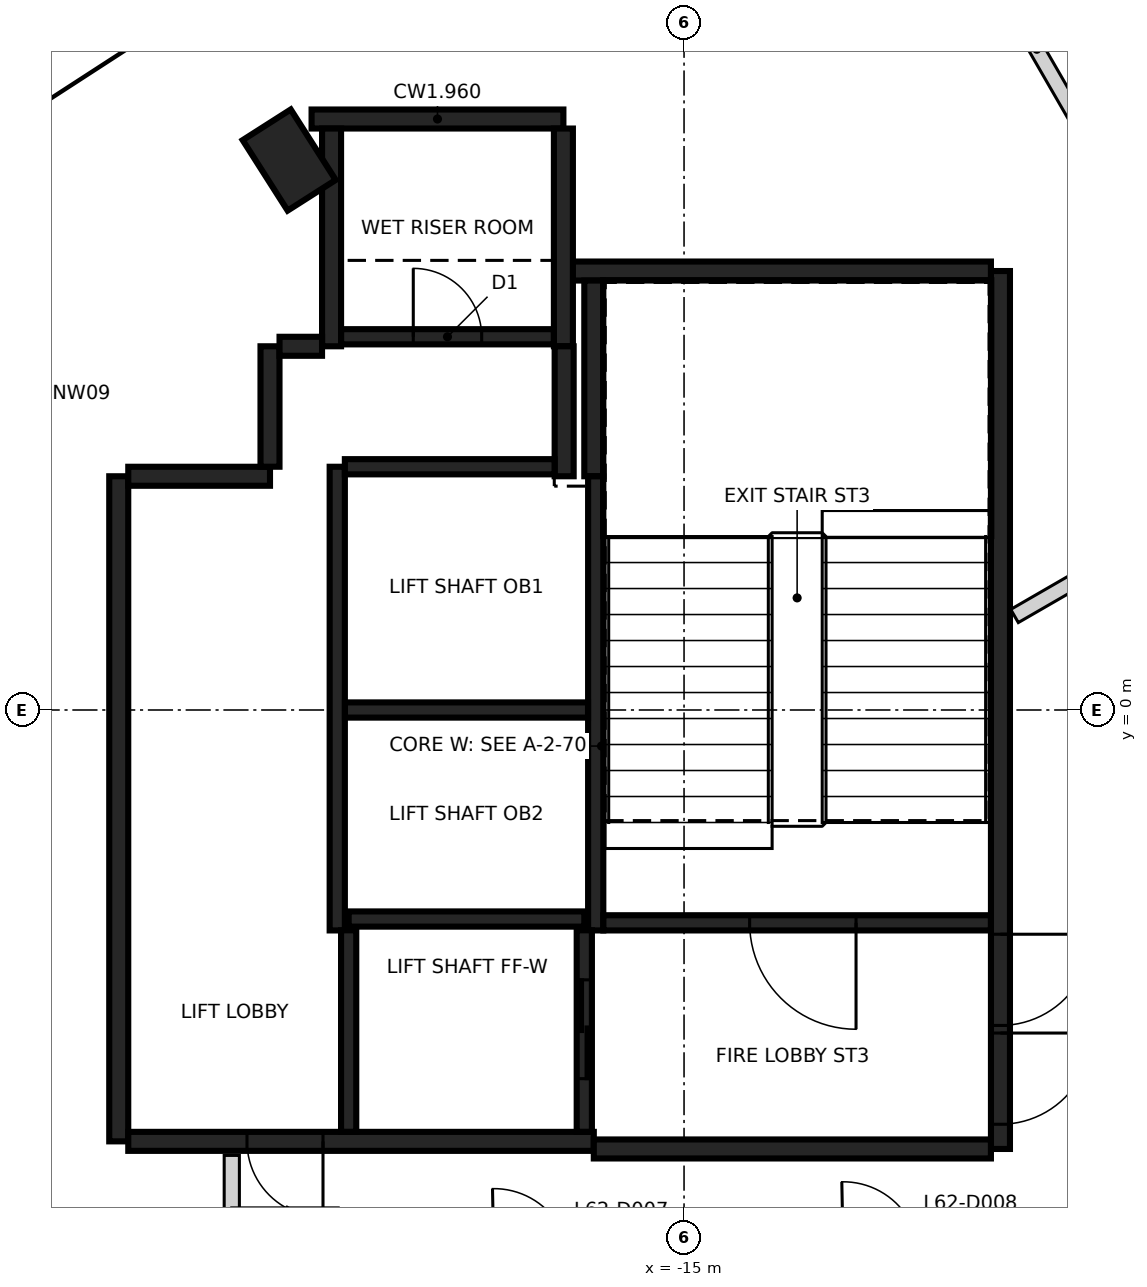
"""IFC4 building model, lengths in metres.
Left out: names, types, materials, properties, quantities, classifications, styles, units other than length and angle.
Written with IfcOpenShell. Run it as: python <this file> out.ifc"""

import sys

from ifc_helpers import new_model, si_unit, direction, frame, frame_2d, origin, origin_2d, place, context, subcontext, project, spatial, rectangle, extrude, element, fill, save


model = new_model("IFC4")
c1 = context("Model", 3, precision=1e-05, world=origin(), true_north=direction((0.0, 1.0)))
c2 = subcontext(c1, "Body", "Model", "MODEL_VIEW")
j1 = project(units=[si_unit("LENGTHUNIT", "METRE"), si_unit("PLANEANGLEUNIT", "RADIAN")], contexts=[c1])
p1 = place(None, origin())
s1 = spatial("IfcSite", under=j1, at=p1, CompositionType="ELEMENT")
p2 = place(p1, origin())
s2 = spatial("IfcBuilding", under=s1, at=p2, CompositionType="ELEMENT")
p3 = place(p2, frame((0.0, 0.0, 246.6)))
s3 = spatial("IfcBuildingStorey", under=s2, at=p3, CompositionType="ELEMENT", Elevation=246.6)
p4 = place(p3, frame((-20.195, 7.235, -0.35), z_axis=(0.0, 0.0, 1.0), x_axis=(-0.537585144719, 0.843209471114, 0.0)))
e1 = element("IfcColumn", 1, at=p4, inside=s3, PredefinedType="COLUMN", context=c2, shape_type="SweptSolid", body=[
    extrude(rectangle(XDim=1.1, YDim=0.75, at=origin_2d()), origin(), (0.0, 0.0, 1.0), 3.6),
])
p5 = place(p3, frame((-10.837, 5.775, 0.0), z_axis=(0.0, 0.0, 1.0), x_axis=(0.0, -1.0, 0.0)))
e2 = element("IfcWall", 2, at=p5, inside=s3, PredefinedType="SHEAR", context=c2, shape_type="SweptSolid", body=[
    extrude(rectangle(XDim=11.55, YDim=0.25, at=frame_2d((5.775, 0.0))), origin(), (0.0, 0.0, 1.0), 3.25),
])
p6 = place(p5, frame((10.025, 0.0, 0.0)))
e3 = element("IfcOpeningElement", 3, at=p6, cuts=e2, PredefinedType="OPENING", context=c2, shape_type="SweptSolid", body=[
    extrude(rectangle(XDim=1.2, YDim=2.1, at=frame_2d((0.6, 1.05))), frame((0.0, 0.135, 0.0), z_axis=(0.0, -1.0, 0.0), x_axis=(1.0, 0.0, 0.0)), (0.0, 0.0, 1.0), 0.27),
])
p7 = place(p5, frame((8.725, 0.0, 0.0)))
e4 = element("IfcOpeningElement", 4, at=p7, cuts=e2, PredefinedType="OPENING", context=c2, shape_type="SweptSolid", body=[
    extrude(rectangle(XDim=1.2, YDim=2.1, at=frame_2d((0.6, 1.05))), frame((0.0, 0.135, 0.0), z_axis=(0.0, -1.0, 0.0), x_axis=(1.0, 0.0, 0.0)), (0.0, 0.0, 1.0), 0.27),
])
p8 = place(p3, frame((-22.437, -5.675, 0.0), z_axis=(0.0, 0.0, 1.0), x_axis=(0.0, 1.0, 0.0)))
e5 = element("IfcWall", 5, at=p8, inside=s3, PredefinedType="SHEAR", context=c2, shape_type="SweptSolid", body=[
    extrude(rectangle(XDim=8.75, YDim=0.25, at=frame_2d((4.375, 0.0))), origin(), (0.0, 0.0, 1.0), 3.25),
])
p9 = place(p3, frame((-16.187, -5.675, 0.0), z_axis=(0.0, 0.0, 1.0), x_axis=(-1.0, 0.0, 0.0)))
e6 = element("IfcWall", 6, at=p9, inside=s3, PredefinedType="SHEAR", context=c2, shape_type="SweptSolid", body=[
    extrude(rectangle(XDim=6.125, YDim=0.25, at=frame_2d((3.062, 0.0))), origin(), (0.0, 0.0, 1.0), 3.25),
])
p10 = place(p9, frame((3.563, 0.0, 0.0)))
e7 = element("IfcOpeningElement", 7, at=p10, cuts=e6, PredefinedType="OPENING", context=c2, shape_type="SweptSolid", body=[
    extrude(rectangle(XDim=1.0, YDim=2.1, at=frame_2d((0.5, 1.05))), frame((0.0, 0.135, 0.0), z_axis=(0.0, -1.0, 0.0), x_axis=(1.0, 0.0, 0.0)), (0.0, 0.0, 1.0), 0.27),
])
p11 = place(p3, frame((-10.963, -5.775, 0.0), z_axis=(0.0, 0.0, 1.0), x_axis=(-1.0, 0.0, 0.0)))
e8 = element("IfcWall", 8, at=p11, inside=s3, PredefinedType="SHEAR", context=c2, shape_type="SweptSolid", body=[
    extrude(rectangle(XDim=5.225, YDim=0.25, at=frame_2d((2.612, 0.0))), origin(), (0.0, 0.0, 1.0), 3.25),
])
p12 = place(p3, frame((-16.472, 5.775, 0.0), z_axis=(0.0, 0.0, 1.0), x_axis=(1.0, 0.0, 0.0)))
e9 = element("IfcWall", 9, at=p12, inside=s3, PredefinedType="SHEAR", context=c2, shape_type="SweptSolid", body=[
    extrude(rectangle(XDim=5.51, YDim=0.25, at=frame_2d((2.755, 0.0))), origin(), (0.0, 0.0, 1.0), 3.25),
])
p13 = place(p3, frame((-19.9, 7.775, 0.0), z_axis=(0.0, 0.0, 1.0), x_axis=(1.0, 0.0, 0.0)))
e10 = element("IfcWall", 10, at=p13, inside=s3, PredefinedType="SHEAR", context=c2, shape_type="SweptSolid", body=[
    extrude(rectangle(XDim=3.313, YDim=0.25, at=frame_2d((1.656, 0.0))), origin(), (0.0, 0.0, 1.0), 3.25),
])
for number, where, z_axis, x_axis in (
    (11, (-16.587, 7.65, 0.0), (0.0, 0.0, 1.0), (0.0, -1.0, 0.0)),
    (12, (-19.637, 4.785, 0.0), (0.0, 0.0, 1.0), (0.0, 1.0, 0.0)),
):
    element("IfcWall", number, at=place(p3, frame(where, z_axis=z_axis, x_axis=x_axis)), inside=s3, PredefinedType="SHEAR", context=c2, shape_type="SweptSolid", body=[
        extrude(rectangle(XDim=2.865, YDim=0.25, at=frame_2d((1.432, 0.0))), origin(), (0.0, 0.0, 1.0), 3.25),
    ])
p14 = place(p3, frame((-16.187, 3.075, 0.0), z_axis=(0.0, 0.0, 1.0), x_axis=(0.0, 1.0, 0.0)))
e13 = element("IfcWall", 13, at=p14, inside=s3, PredefinedType="SHEAR", context=c2, shape_type="SweptSolid", body=[
    extrude(rectangle(XDim=2.575, YDim=0.25, at=frame_2d((1.287, 0.0))), origin(), (0.0, 0.0, 1.0), 3.25),
])
p15 = place(p3, frame((-22.312, 3.075, 0.0), z_axis=(0.0, 0.0, 1.0), x_axis=(1.0, 0.0, 0.0)))
e14 = element("IfcWall", 14, at=p15, inside=s3, PredefinedType="SHEAR", context=c2, shape_type="SweptSolid", body=[
    extrude(rectangle(XDim=1.865, YDim=0.25, at=frame_2d((0.932, 0.0))), origin(), (0.0, 0.0, 1.0), 3.25),
])
p16 = place(p3, frame((-16.577, 4.785, 0.0), z_axis=(0.0, 0.0, 1.0), x_axis=(0.0, -1.0, 0.0)))
e15 = element("IfcWall", 15, at=p16, inside=s3, PredefinedType="SHEAR", context=c2, shape_type="SweptSolid", body=[
    extrude(rectangle(XDim=1.71, YDim=0.25, at=frame_2d((0.855, 0.0))), origin(), (0.0, 0.0, 1.0), 3.25),
])
p17 = place(p3, frame((-20.447, 3.2, 0.0), z_axis=(0.0, 0.0, 1.0), x_axis=(0.0, 1.0, 0.0)))
e16 = element("IfcWall", 16, at=p17, inside=s3, PredefinedType="SHEAR", context=c2, shape_type="SweptSolid", body=[
    extrude(rectangle(XDim=1.584, YDim=0.25, at=frame_2d((0.792, 0.0))), origin(), (0.0, 0.0, 1.0), 3.25),
])
p18 = place(p3, frame((-20.322, 4.785, 0.0), z_axis=(0.0, 0.0, 1.0), x_axis=(1.0, 0.0, 0.0)))
e17 = element("IfcWall", 17, at=p18, inside=s3, PredefinedType="SHEAR", context=c2, shape_type="SweptSolid", body=[
    extrude(rectangle(XDim=0.559, YDim=0.25, at=frame_2d((0.28, 0.0))), origin(), (0.0, 0.0, 1.0), 3.25),
])
p19 = place(p3, frame((-16.162, 3.074, 0.0), z_axis=(0.0, 0.0, 1.0), x_axis=(0.0, -1.0, 0.0)))
e18 = element("IfcWall", 18, at=p19, inside=s3, PredefinedType="SHEAR", context=c2, shape_type="SweptSolid", body=[
    extrude(rectangle(XDim=5.974, YDim=0.2, at=frame_2d((2.987, 0.0))), origin(), (0.0, 0.0, 1.0), 3.25),
])
p20 = place(p3, frame((-19.562, -2.9, 0.0), z_axis=(0.0, 0.0, 1.0), x_axis=(0.0, 1.0, 0.0)))
e19 = element("IfcWall", 19, at=p20, inside=s3, PredefinedType="SHEAR", context=c2, shape_type="SweptSolid", body=[
    extrude(rectangle(XDim=6.1, YDim=0.2, at=frame_2d((3.05, 0.0))), origin(), (0.0, 0.0, 1.0), 3.25),
])
p21 = place(p3, frame((-10.963, -2.8, 0.0), z_axis=(0.0, 0.0, 1.0), x_axis=(-1.0, 0.0, 0.0)))
e20 = element("IfcWall", 20, at=p21, inside=s3, PredefinedType="SHEAR", context=c2, shape_type="SweptSolid", body=[
    extrude(rectangle(XDim=5.098, YDim=0.2, at=frame_2d((2.549, 0.0))), origin(), (0.0, 0.0, 1.0), 3.25),
])
p22 = place(p21, frame((1.774, 0.0, 0.0)))
e21 = element("IfcOpeningElement", 21, at=p22, cuts=e20, PredefinedType="OPENING", context=c2, shape_type="SweptSolid", body=[
    extrude(rectangle(XDim=1.4, YDim=2.1, at=frame_2d((0.7, 1.05))), frame((0.0, 0.11, 0.0), z_axis=(0.0, -1.0, 0.0), x_axis=(1.0, 0.0, 0.0)), (0.0, 0.0, 1.0), 0.22),
])
p23 = place(p3, frame((-16.263, 0.0, 0.0), z_axis=(0.0, 0.0, 1.0), x_axis=(-1.0, 0.0, 0.0)))
e22 = element("IfcWall", 22, at=p23, inside=s3, PredefinedType="SHEAR", context=c2, shape_type="SweptSolid", body=[
    extrude(rectangle(XDim=3.198, YDim=0.2, at=frame_2d((1.599, 0.0))), origin(), (0.0, 0.0, 1.0), 3.25),
])
p24 = place(p3, frame((-19.511, 4.91, 0.0), z_axis=(0.0, 0.0, 1.0), x_axis=(1.0, 0.0, 0.0)))
e23 = element("IfcWall", 23, at=p24, inside=s3, PredefinedType="SHEAR", context=c2, shape_type="SweptSolid", body=[
    extrude(rectangle(XDim=2.798, YDim=0.2, at=frame_2d((1.399, 0.0))), origin(), (0.0, 0.0, 1.0), 3.25),
])
p25 = place(p24, frame((0.949, 0.0, 0.0)))
e24 = element("IfcOpeningElement", 24, at=p25, cuts=e23, PredefinedType="OPENING", context=c2, shape_type="SweptSolid", body=[
    extrude(rectangle(XDim=0.9, YDim=2.1, at=frame_2d((0.45, 1.05))), frame((0.0, 0.11, 0.0), z_axis=(0.0, -1.0, 0.0), x_axis=(1.0, 0.0, 0.0)), (0.0, 0.0, 1.0), 0.22),
])
p26 = place(p3, frame((-19.462, 3.2, 0.0), z_axis=(0.0, 0.0, 1.0), x_axis=(1.0, 0.0, 0.0)))
e25 = element("IfcWall", 25, at=p26, inside=s3, PredefinedType="SHEAR", context=c2, shape_type="SweptSolid", body=[
    extrude(rectangle(XDim=2.759, YDim=0.2, at=frame_2d((1.379, 0.0))), origin(), (0.0, 0.0, 1.0), 3.25),
])
p27 = place(p3, frame((-19.412, -2.75, 0.0), z_axis=(0.0, 0.0, 1.0), x_axis=(1.0, 0.0, 0.0)))
e26 = element("IfcWall", 26, at=p27, inside=s3, PredefinedType="SHEAR", context=c2, shape_type="SweptSolid", body=[
    extrude(rectangle(XDim=3.1, YDim=0.2, at=frame_2d((1.55, 0.0))), origin(), (0.0, 0.0, 1.0), 3.25),
])
p28 = place(p3, frame((-16.312, -2.898, 0.0), z_axis=(0.0, 0.0, 1.0), x_axis=(0.0, -1.0, 0.0)))
e27 = element("IfcWall", 27, at=p28, inside=s3, PredefinedType="SHEAR", context=c2, shape_type="SweptSolid", body=[
    extrude(rectangle(XDim=2.651, YDim=0.2, at=frame_2d((1.325, 0.0))), origin(), (0.0, 0.0, 1.0), 3.25),
])
p29 = place(p28, frame((0.652, 0.0, 0.0)))
e28 = element("IfcOpeningElement", 28, at=p29, cuts=e27, PredefinedType="OPENING", context=c2, shape_type="SweptSolid", body=[
    extrude(rectangle(XDim=1.3, YDim=2.1, at=frame_2d((0.65, 1.05))), frame((0.0, 0.11, 0.0), z_axis=(0.0, -1.0, 0.0), x_axis=(1.0, 0.0, 0.0)), (0.0, 0.0, 1.0), 0.22),
])
p30 = place(p3, frame((-19.412, -5.549, 0.0), z_axis=(0.0, 0.0, 1.0), x_axis=(0.0, 1.0, 0.0)))
e29 = element("IfcWall", 29, at=p30, inside=s3, PredefinedType="SHEAR", context=c2, shape_type="SweptSolid", body=[
    extrude(rectangle(XDim=2.651, YDim=0.2, at=frame_2d((1.325, 0.0))), origin(), (0.0, 0.0, 1.0), 3.25),
])
p31 = place(p3, frame((-20.95, -6.65, 0.0), z_axis=(0.0, 0.0, 1.0), x_axis=(0.0, 1.0, 0.0)))
e30 = element("IfcWall", 30, at=p31, inside=s3, PredefinedType="PARTITIONING", context=c2, shape_type="SweptSolid", body=[
    extrude(rectangle(XDim=0.79, YDim=0.2, at=frame_2d((0.395, 0.0))), origin(), (0.0, 0.0, 1.0), 2.35),
])
p32 = place(p3, frame((-20.95, -6.65, 0.0), z_axis=(0.0, 0.0, 1.0), x_axis=(1.0, 0.0, 0.0)))
e31 = element("IfcWall", 31, at=p32, inside=s3, PredefinedType="PARTITIONING", context=c2, shape_type="SweptSolid", body=[
    extrude(rectangle(XDim=1.4, YDim=0.2, at=frame_2d((0.7, 0.0))), origin(), (0.0, 0.0, 1.0), 2.35),
])
p33 = place(p3, frame((-10.652, 1.237, 0.0), z_axis=(0.0, 0.0, 1.0), x_axis=(0.865922902183, 0.50017749597, 0.0)))
e32 = element("IfcWall", 32, at=p33, inside=s3, PredefinedType="PARTITIONING", context=c2, shape_type="SweptSolid", body=[
    extrude(rectangle(XDim=13.328, YDim=0.2, at=frame_2d((6.664, 0.0))), origin(), (0.0, 0.0, 1.0), 3.25),
])
p34 = place(p33, frame((4.171, 0.0, 0.0)))
e33 = element("IfcOpeningElement", 33, at=p34, cuts=e32, PredefinedType="OPENING", context=c2, shape_type="SweptSolid", body=[
    extrude(rectangle(XDim=0.95, YDim=2.1, at=frame_2d((0.475, 1.05))), frame((0.0, 0.11, 0.0), z_axis=(0.0, -1.0, 0.0), x_axis=(1.0, 0.0, 0.0)), (0.0, 0.0, 1.0), 0.22),
])
p35 = place(p33, frame((1.463, 0.0, 0.0)))
e34 = element("IfcOpeningElement", 34, at=p35, cuts=e32, PredefinedType="OPENING", context=c2, shape_type="SweptSolid", body=[
    extrude(rectangle(XDim=1.0, YDim=2.1, at=frame_2d((0.5, 1.05))), frame((0.0, 0.11, 0.0), z_axis=(0.0, -1.0, 0.0), x_axis=(1.0, 0.0, 0.0)), (0.0, 0.0, 1.0), 0.22),
])
p36 = place(p3, frame((-9.931, -7.149, 0.0), z_axis=(0.0, 0.0, 1.0), x_axis=(0.499829760107, 0.866123669525, 0.0)))
e35 = element("IfcWall", 35, at=p36, inside=s3, PredefinedType="PARTITIONING", context=c2, shape_type="SweptSolid", body=[
    extrude(rectangle(XDim=2.889, YDim=0.2, at=frame_2d((1.444, 0.0))), origin(), (0.0, 0.0, 1.0), 3.25),
])
p37 = place(p3, frame((-13.513, 14.156, 0.0), z_axis=(0.0, 0.0, 1.0), x_axis=(0.500012240511, -0.866018336607, 0.0)))
e36 = element("IfcWall", 36, at=p37, inside=s3, PredefinedType="PARTITIONING", context=c2, shape_type="SweptSolid", body=[
    extrude(rectangle(XDim=12.616, YDim=0.2, at=frame_2d((6.308, 0.0))), origin(), (0.0, 0.0, 1.0), 3.25),
])
p38 = place(p29, origin())
e37 = element("IfcDoor", 37, at=p38, inside=s3, OperationType="SLIDING_TO_LEFT", PredefinedType="DOOR", context=c2, shape_type="SweptSolid", body=[
    extrude(rectangle(XDim=1.3, YDim=2.1, at=frame_2d((0.65, 1.05))), frame((0.0, 0.025, 0.0), z_axis=(0.0, -1.0, 0.0), x_axis=(1.0, 0.0, 0.0)), (0.0, 0.0, 1.0), 0.05),
])
fill(e28, e37)
p39 = place(p10, origin())
e38 = element("IfcDoor", 38, at=p39, inside=s3, OperationType="SINGLE_SWING_LEFT", PredefinedType="DOOR", context=c2, shape_type="SweptSolid", body=[
    extrude(rectangle(XDim=1.0, YDim=2.1, at=frame_2d((0.5, 1.05))), frame((0.0, 0.025, 0.0), z_axis=(0.0, -1.0, 0.0), x_axis=(1.0, 0.0, 0.0)), (0.0, 0.0, 1.0), 0.05),
])
fill(e7, e38)
p40 = place(p6, origin())
e39 = element("IfcDoor", 39, at=p40, inside=s3, OperationType="SINGLE_SWING_LEFT", PredefinedType="DOOR", context=c2, shape_type="SweptSolid", body=[
    extrude(rectangle(XDim=1.2, YDim=2.1, at=frame_2d((0.6, 1.05))), frame((0.0, 0.025, 0.0), z_axis=(0.0, -1.0, 0.0), x_axis=(1.0, 0.0, 0.0)), (0.0, 0.0, 1.0), 0.05),
])
fill(e3, e39)
p41 = place(p7, origin())
e40 = element("IfcDoor", 40, at=p41, inside=s3, OperationType="SINGLE_SWING_RIGHT", PredefinedType="DOOR", context=c2, shape_type="SweptSolid", body=[
    extrude(rectangle(XDim=1.2, YDim=2.1, at=frame_2d((0.6, 1.05))), frame((0.0, 0.025, 0.0), z_axis=(0.0, -1.0, 0.0), x_axis=(1.0, 0.0, 0.0)), (0.0, 0.0, 1.0), 0.05),
])
fill(e4, e40)
p42 = place(p22, origin())
e41 = element("IfcDoor", 41, at=p42, inside=s3, OperationType="SINGLE_SWING_LEFT", PredefinedType="DOOR", context=c2, shape_type="SweptSolid", body=[
    extrude(rectangle(XDim=1.4, YDim=2.1, at=frame_2d((0.7, 1.05))), frame((0.0, 0.025, 0.0), z_axis=(0.0, -1.0, 0.0), x_axis=(1.0, 0.0, 0.0)), (0.0, 0.0, 1.0), 0.05),
])
fill(e21, e41)
p43 = place(p25, origin())
e42 = element("IfcDoor", 42, at=p43, inside=s3, OperationType="SINGLE_SWING_RIGHT", PredefinedType="DOOR", context=c2, shape_type="SweptSolid", body=[
    extrude(rectangle(XDim=0.9, YDim=2.1, at=frame_2d((0.45, 1.05))), frame((0.0, 0.025, 0.0), z_axis=(0.0, -1.0, 0.0), x_axis=(1.0, 0.0, 0.0)), (0.0, 0.0, 1.0), 0.05),
])
fill(e24, e42)
save(model, sys.argv[1])
